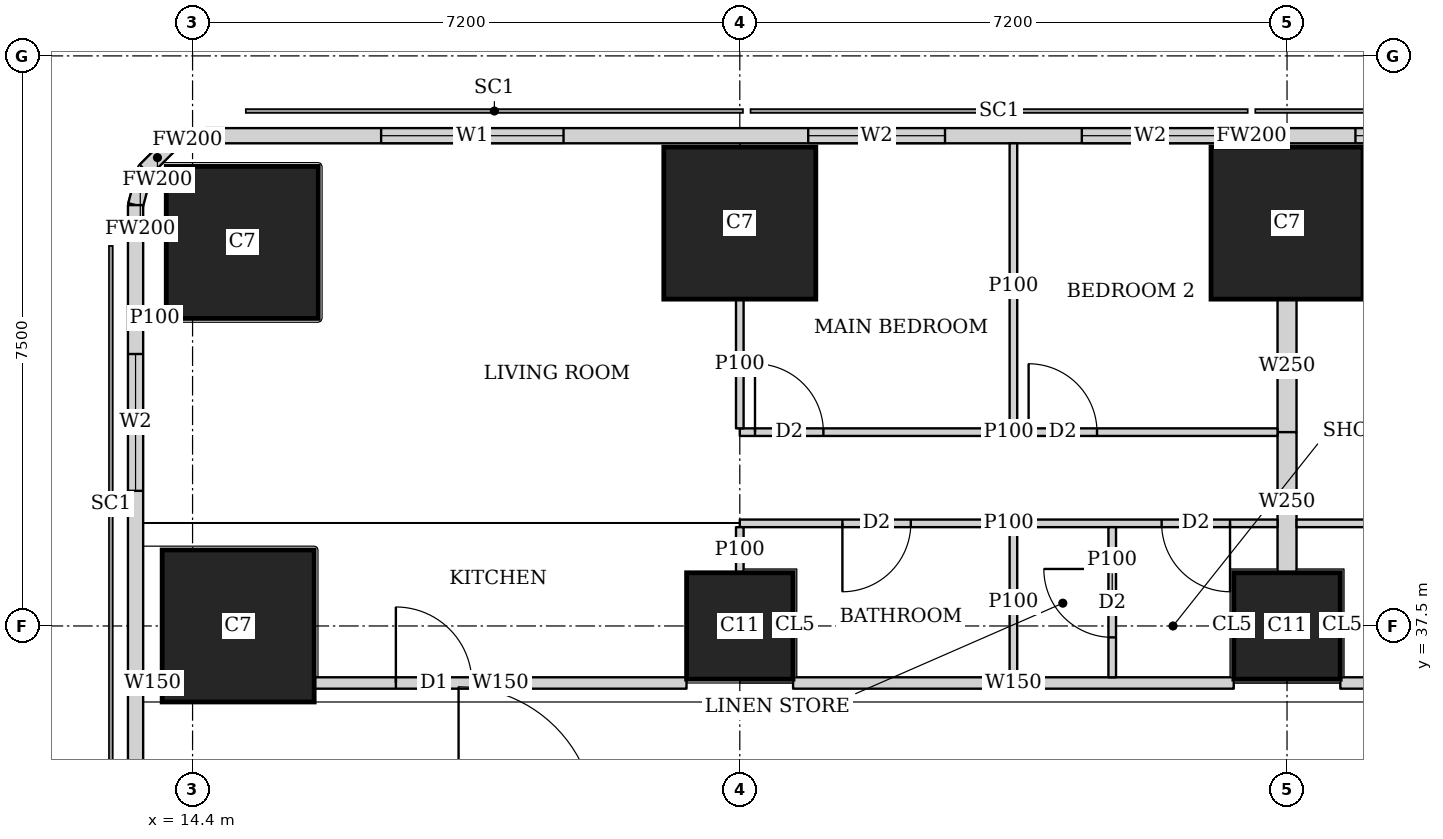
"""IFC4 building model, lengths in metres.
Left out: names, types, materials, properties, quantities, classifications, styles, units other than length and angle.
Written with IfcOpenShell. Run it as: python <this file> out.ifc"""

import sys

from ifc_helpers import new_model, si_unit, direction, frame, frame_2d, origin, origin_2d, place, context, subcontext, project, spatial, rectangle, extrude, element, fill, save


model = new_model("IFC4")
c1 = context("Model", 3, precision=1e-05, world=origin(), true_north=direction((0.0, 1.0)))
c2 = subcontext(c1, "Body", "Model", "MODEL_VIEW")
j1 = project(units=[si_unit("LENGTHUNIT", "METRE"), si_unit("PLANEANGLEUNIT", "RADIAN")], contexts=[c1])
p1 = place(None, origin())
s1 = spatial("IfcSite", under=j1, at=p1, CompositionType="ELEMENT")
p2 = place(p1, origin())
s2 = spatial("IfcBuilding", under=s1, at=p2, CompositionType="ELEMENT")
p3 = place(p2, frame((0.0, 0.0, 281.6)))
s3 = spatial("IfcBuildingStorey", under=s2, at=p3, CompositionType="ELEMENT", Elevation=281.6)
p4 = place(p3, frame((15.0, 37.5, 0.0), z_axis=(0.0, 0.0, 1.0), x_axis=(1.0, 0.0, 0.0)))
e1 = element("IfcColumn", 1, at=p4, inside=s3, PredefinedType="COLUMN", context=c2, shape_type="SweptSolid", body=[
    extrude(rectangle(XDim=2.0, YDim=2.0, at=origin_2d()), origin(), (0.0, 0.0, 1.0), 3.75),
])
for number, where, z_axis, x_axis in (
    (2, (21.6, 37.5, 0.0), (0.0, 0.0, 1.0), (1.0, 0.0, 0.0)),
    (3, (28.8, 37.5, 0.0), (0.0, 0.0, 1.0), (1.0, 0.0, 0.0)),
):
    element("IfcColumn", number, at=place(p3, frame(where, z_axis=z_axis, x_axis=x_axis)), inside=s3, PredefinedType="COLUMN", context=c2, shape_type="SweptSolid", body=[
        extrude(rectangle(XDim=1.4, YDim=1.4, at=origin_2d()), origin(), (0.0, 0.0, 1.0), 3.75),
    ])
for number, where, z_axis, x_axis in (
    (4, (15.054, 42.546, 0.0), (0.0, 0.0, 1.0), (1.0, 0.0, 0.0)),
    (5, (21.6, 42.8, 0.0), (0.0, 0.0, 1.0), (1.0, 0.0, 0.0)),
    (6, (28.8, 42.8, 0.0), (0.0, 0.0, 1.0), (1.0, 0.0, 0.0)),
):
    element("IfcColumn", number, at=place(p3, frame(where, z_axis=z_axis, x_axis=x_axis)), inside=s3, PredefinedType="COLUMN", context=c2, shape_type="SweptSolid", body=[
        extrude(rectangle(XDim=2.0, YDim=2.0, at=origin_2d()), origin(), (0.0, 0.0, 1.0), 3.75),
    ])
p5 = place(p3, frame((42.103, 43.95, 0.0), z_axis=(0.0, 0.0, 1.0), x_axis=(-1.0, 0.0, 0.0)))
e7 = element("IfcWall", 7, at=p5, inside=s3, PredefinedType="SOLIDWALL", context=c2, shape_type="SweptSolid", body=[
    extrude(rectangle(XDim=27.54, YDim=0.2, at=frame_2d((13.77, 0.0))), origin(), (0.0, 0.0, 1.0), 3.5),
])
p6 = place(p5, frame((10.603, 0.0, 0.9)))
e8 = element("IfcOpeningElement", 8, at=p6, cuts=e7, PredefinedType="OPENING", context=c2, shape_type="SweptSolid", body=[
    extrude(rectangle(XDim=1.8, YDim=1.5, at=frame_2d((0.9, 0.75))), frame((0.0, 0.11, 0.0), z_axis=(0.0, -1.0, 0.0), x_axis=(1.0, 0.0, 0.0)), (0.0, 0.0, 1.0), 0.22),
])
p7 = place(p5, frame((14.203, 0.0, 0.9)))
e9 = element("IfcOpeningElement", 9, at=p7, cuts=e7, PredefinedType="OPENING", context=c2, shape_type="SweptSolid", body=[
    extrude(rectangle(XDim=1.8, YDim=1.5, at=frame_2d((0.9, 0.75))), frame((0.0, 0.11, 0.0), z_axis=(0.0, -1.0, 0.0), x_axis=(1.0, 0.0, 0.0)), (0.0, 0.0, 1.0), 0.22),
])
p8 = place(p5, frame((17.803, 0.0, 0.9)))
e10 = element("IfcOpeningElement", 10, at=p8, cuts=e7, PredefinedType="OPENING", context=c2, shape_type="SweptSolid", body=[
    extrude(rectangle(XDim=1.8, YDim=1.5, at=frame_2d((0.9, 0.75))), frame((0.0, 0.11, 0.0), z_axis=(0.0, -1.0, 0.0), x_axis=(1.0, 0.0, 0.0)), (0.0, 0.0, 1.0), 0.22),
])
p9 = place(p5, frame((22.822, 0.0, 0.9)))
e11 = element("IfcOpeningElement", 11, at=p9, cuts=e7, PredefinedType="OPENING", context=c2, shape_type="SweptSolid", body=[
    extrude(rectangle(XDim=2.4, YDim=1.5, at=frame_2d((1.2, 0.75))), frame((0.0, 0.11, 0.0), z_axis=(0.0, -1.0, 0.0), x_axis=(1.0, 0.0, 0.0)), (0.0, 0.0, 1.0), 0.22),
])
p10 = place(p3, frame((14.563, 43.95, 0.0), z_axis=(0.0, 0.0, 1.0), x_axis=(-0.965655254015, -0.259826731483, 0.0)))
e12 = element("IfcWall", 12, at=p10, inside=s3, PredefinedType="SOLIDWALL", context=c2, shape_type="SweptSolid", body=[
    extrude(rectangle(XDim=0.477, YDim=0.2, at=frame_2d((0.239, 0.0))), origin(), (0.0, 0.0, 1.0), 3.5),
])
p11 = place(p3, frame((14.102, 43.826, 0.0), z_axis=(0.0, 0.0, 1.0), x_axis=(-0.707369890659, -0.706843573776, 0.0)))
e13 = element("IfcWall", 13, at=p11, inside=s3, PredefinedType="SOLIDWALL", context=c2, shape_type="SweptSolid", body=[
    extrude(rectangle(XDim=0.464, YDim=0.2, at=frame_2d((0.232, 0.0))), origin(), (0.0, 0.0, 1.0), 3.5),
])
p12 = place(p3, frame((13.774, 43.498, 0.0), z_axis=(0.0, 0.0, 1.0), x_axis=(-0.259826731483, -0.965655254015, 0.0)))
e14 = element("IfcWall", 14, at=p12, inside=s3, PredefinedType="SOLIDWALL", context=c2, shape_type="SweptSolid", body=[
    extrude(rectangle(XDim=0.477, YDim=0.2, at=frame_2d((0.239, 0.0))), origin(), (0.0, 0.0, 1.0), 3.5),
])
p13 = place(p3, frame((13.65, 43.037, 0.0), z_axis=(0.0, 0.0, 1.0), x_axis=(0.0, -1.0, 0.0)))
e15 = element("IfcWall", 15, at=p13, inside=s3, PredefinedType="SOLIDWALL", context=c2, shape_type="SweptSolid", body=[
    extrude(rectangle(XDim=35.374, YDim=0.2, at=frame_2d((17.687, 0.0))), origin(), (0.0, 0.0, 1.0), 3.5),
])
p14 = place(p13, frame((1.959, 0.0, 0.9)))
e16 = element("IfcOpeningElement", 16, at=p14, cuts=e15, PredefinedType="OPENING", context=c2, shape_type="SweptSolid", body=[
    extrude(rectangle(XDim=1.8, YDim=1.5, at=frame_2d((0.9, 0.75))), frame((0.0, 0.11, 0.0), z_axis=(0.0, -1.0, 0.0), x_axis=(1.0, 0.0, 0.0)), (0.0, 0.0, 1.0), 0.22),
])
p15 = place(p3, frame((13.75, 36.75, 0.0), z_axis=(0.0, 0.0, 1.0), x_axis=(1.0, 0.0, 0.0)))
e17 = element("IfcWall", 17, at=p15, inside=s3, PredefinedType="SOLIDWALL", context=c2, shape_type="SweptSolid", body=[
    extrude(rectangle(XDim=0.249, YDim=0.15, at=frame_2d((0.125, 0.0))), origin(), (0.0, 0.0, 1.0), 3.5),
])
p16 = place(p3, frame((16.001, 36.75, 0.0), z_axis=(0.0, 0.0, 1.0), x_axis=(1.0, 0.0, 0.0)))
e18 = element("IfcWall", 18, at=p16, inside=s3, PredefinedType="SOLIDWALL", context=c2, shape_type="SweptSolid", body=[
    extrude(rectangle(XDim=4.898, YDim=0.15, at=frame_2d((2.449, 0.0))), origin(), (0.0, 0.0, 1.0), 3.5),
])
p17 = place(p16, frame((1.074, 0.0, 0.0)))
e19 = element("IfcOpeningElement", 19, at=p17, cuts=e18, PredefinedType="OPENING", context=c2, shape_type="SweptSolid", body=[
    extrude(rectangle(XDim=1.0, YDim=2.1, at=frame_2d((0.5, 1.05))), frame((0.0, 0.085, 0.0), z_axis=(0.0, -1.0, 0.0), x_axis=(1.0, 0.0, 0.0)), (0.0, 0.0, 1.0), 0.17),
])
p18 = place(p3, frame((22.301, 36.75, 0.0), z_axis=(0.0, 0.0, 1.0), x_axis=(1.0, 0.0, 0.0)))
e20 = element("IfcWall", 20, at=p18, inside=s3, PredefinedType="SOLIDWALL", context=c2, shape_type="SweptSolid", body=[
    extrude(rectangle(XDim=5.798, YDim=0.15, at=frame_2d((2.899, 0.0))), origin(), (0.0, 0.0, 1.0), 3.5),
])
p19 = place(p3, frame((29.501, 36.75, 0.0), z_axis=(0.0, 0.0, 1.0), x_axis=(1.0, 0.0, 0.0)))
e21 = element("IfcWall", 21, at=p19, inside=s3, PredefinedType="SOLIDWALL", context=c2, shape_type="SweptSolid", body=[
    extrude(rectangle(XDim=5.216, YDim=0.15, at=frame_2d((2.608, 0.0))), origin(), (0.0, 0.0, 1.0), 3.5),
])
p20 = place(p19, frame((3.305, 0.0, 0.0)))
e22 = element("IfcOpeningElement", 22, at=p20, cuts=e21, PredefinedType="OPENING", context=c2, shape_type="SweptSolid", body=[
    extrude(rectangle(XDim=1.0, YDim=2.1, at=frame_2d((0.5, 1.05))), frame((0.0, 0.085, 0.0), z_axis=(0.0, -1.0, 0.0), x_axis=(1.0, 0.0, 0.0)), (0.0, 0.0, 1.0), 0.17),
])
p21 = place(p3, frame((14.054, 41.546, 0.0), z_axis=(0.0, 0.0, 1.0), x_axis=(-1.0, 0.0, 0.0)))
e23 = element("IfcWall", 23, at=p21, inside=s3, PredefinedType="PARTITIONING", context=c2, shape_type="SweptSolid", body=[
    extrude(rectangle(XDim=0.304, YDim=0.1, at=frame_2d((0.152, 0.0))), origin(), (0.0, 0.0, 1.0), 3.5),
])
p22 = place(p3, frame((21.6, 40.05, 0.0), z_axis=(0.0, 0.0, 1.0), x_axis=(1.0, 0.0, 0.0)))
e24 = element("IfcWall", 24, at=p22, inside=s3, PredefinedType="PARTITIONING", context=c2, shape_type="SweptSolid", body=[
    extrude(rectangle(XDim=7.075, YDim=0.1, at=frame_2d((3.538, 0.0))), origin(), (0.0, 0.0, 1.0), 3.5),
])
p23 = place(p22, frame((0.2, 0.0, 0.0)))
e25 = element("IfcOpeningElement", 25, at=p23, cuts=e24, PredefinedType="OPENING", context=c2, shape_type="SweptSolid", body=[
    extrude(rectangle(XDim=0.9, YDim=2.1, at=frame_2d((0.45, 1.05))), frame((0.0, 0.06, 0.0), z_axis=(0.0, -1.0, 0.0), x_axis=(1.0, 0.0, 0.0)), (0.0, 0.0, 1.0), 0.12),
])
p24 = place(p22, frame((3.8, 0.0, 0.0)))
e26 = element("IfcOpeningElement", 26, at=p24, cuts=e24, PredefinedType="OPENING", context=c2, shape_type="SweptSolid", body=[
    extrude(rectangle(XDim=0.9, YDim=2.1, at=frame_2d((0.45, 1.05))), frame((0.0, 0.06, 0.0), z_axis=(0.0, -1.0, 0.0), x_axis=(1.0, 0.0, 0.0)), (0.0, 0.0, 1.0), 0.12),
])
p25 = place(p3, frame((21.6, 38.85, 0.0), z_axis=(0.0, 0.0, 1.0), x_axis=(1.0, 0.0, 0.0)))
e27 = element("IfcWall", 27, at=p25, inside=s3, PredefinedType="PARTITIONING", context=c2, shape_type="SweptSolid", body=[
    extrude(rectangle(XDim=7.075, YDim=0.1, at=frame_2d((3.538, 0.0))), origin(), (0.0, 0.0, 1.0), 3.5),
])
p26 = place(p25, frame((1.35, 0.0, 0.0)))
e28 = element("IfcOpeningElement", 28, at=p26, cuts=e27, PredefinedType="OPENING", context=c2, shape_type="SweptSolid", body=[
    extrude(rectangle(XDim=0.9, YDim=2.1, at=frame_2d((0.45, 1.05))), frame((0.0, 0.06, 0.0), z_axis=(0.0, -1.0, 0.0), x_axis=(1.0, 0.0, 0.0)), (0.0, 0.0, 1.0), 0.12),
])
p27 = place(p25, frame((5.55, 0.0, 0.0)))
e29 = element("IfcOpeningElement", 29, at=p27, cuts=e27, PredefinedType="OPENING", context=c2, shape_type="SweptSolid", body=[
    extrude(rectangle(XDim=0.9, YDim=2.1, at=frame_2d((0.45, 1.05))), frame((0.0, 0.06, 0.0), z_axis=(0.0, -1.0, 0.0), x_axis=(1.0, 0.0, 0.0)), (0.0, 0.0, 1.0), 0.12),
])
p28 = place(p3, frame((21.6, 40.1, 0.0), z_axis=(0.0, 0.0, 1.0), x_axis=(0.0, 1.0, 0.0)))
e30 = element("IfcWall", 30, at=p28, inside=s3, PredefinedType="PARTITIONING", context=c2, shape_type="SweptSolid", body=[
    extrude(rectangle(XDim=1.699, YDim=0.1, at=frame_2d((0.85, 0.0))), origin(), (0.0, 0.0, 1.0), 3.5),
])
p29 = place(p3, frame((25.2, 40.1, 0.0), z_axis=(0.0, 0.0, 1.0), x_axis=(0.0, 1.0, 0.0)))
e31 = element("IfcWall", 31, at=p29, inside=s3, PredefinedType="PARTITIONING", context=c2, shape_type="SweptSolid", body=[
    extrude(rectangle(XDim=3.75, YDim=0.1, at=frame_2d((1.875, 0.0))), origin(), (0.0, 0.0, 1.0), 2.05),
])
p30 = place(p3, frame((21.6, 38.201, 0.0), z_axis=(0.0, 0.0, 1.0), x_axis=(0.0, 1.0, 0.0)))
e32 = element("IfcWall", 32, at=p30, inside=s3, PredefinedType="PARTITIONING", context=c2, shape_type="SweptSolid", body=[
    extrude(rectangle(XDim=0.599, YDim=0.1, at=frame_2d((0.3, 0.0))), origin(), (0.0, 0.0, 1.0), 3.5),
])
p31 = place(p3, frame((25.2, 36.825, 0.0), z_axis=(0.0, 0.0, 1.0), x_axis=(0.0, 1.0, 0.0)))
e33 = element("IfcWall", 33, at=p31, inside=s3, PredefinedType="PARTITIONING", context=c2, shape_type="SweptSolid", body=[
    extrude(rectangle(XDim=1.975, YDim=0.1, at=frame_2d((0.988, 0.0))), origin(), (0.0, 0.0, 1.0), 3.5),
])
p32 = place(p3, frame((26.5, 36.825, 0.0), z_axis=(0.0, 0.0, 1.0), x_axis=(0.0, 1.0, 0.0)))
e34 = element("IfcWall", 34, at=p32, inside=s3, PredefinedType="PARTITIONING", context=c2, shape_type="SweptSolid", body=[
    extrude(rectangle(XDim=1.975, YDim=0.1, at=frame_2d((0.988, 0.0))), origin(), (0.0, 0.0, 1.0), 3.5),
])
p33 = place(p32, frame((0.525, 0.0, 0.0)))
e35 = element("IfcOpeningElement", 35, at=p33, cuts=e34, PredefinedType="OPENING", context=c2, shape_type="SweptSolid", body=[
    extrude(rectangle(XDim=0.9, YDim=2.1, at=frame_2d((0.45, 1.05))), frame((0.0, 0.06, 0.0), z_axis=(0.0, -1.0, 0.0), x_axis=(1.0, 0.0, 0.0)), (0.0, 0.0, 1.0), 0.12),
])
p34 = place(p3, frame((28.925, 38.85, 0.0), z_axis=(0.0, 0.0, 1.0), x_axis=(1.0, 0.0, 0.0)))
e36 = element("IfcWall", 36, at=p34, inside=s3, PredefinedType="PARTITIONING", context=c2, shape_type="SweptSolid", body=[
    extrude(rectangle(XDim=2.879, YDim=0.1, at=frame_2d((1.439, 0.0))), origin(), (0.0, 0.0, 1.0), 3.5),
])
p35 = place(p34, frame((0.925, 0.0, 0.0)))
e37 = element("IfcOpeningElement", 37, at=p35, cuts=e36, PredefinedType="OPENING", context=c2, shape_type="SweptSolid", body=[
    extrude(rectangle(XDim=0.9, YDim=2.1, at=frame_2d((0.45, 1.05))), frame((0.0, 0.06, 0.0), z_axis=(0.0, -1.0, 0.0), x_axis=(1.0, 0.0, 0.0)), (0.0, 0.0, 1.0), 0.12),
])
p36 = place(p3, frame((28.8, 40.05, 0.0), z_axis=(0.0, 0.0, 1.0), x_axis=(0.0, 1.0, 0.0)))
e38 = element("IfcWall", 38, at=p36, inside=s3, PredefinedType="SOLIDWALL", context=c2, shape_type="SweptSolid", body=[
    extrude(rectangle(XDim=1.749, YDim=0.25, at=frame_2d((0.875, 0.0))), origin(), (0.0, 0.0, 1.0), 3.5),
])
p37 = place(p3, frame((28.8, 38.201, 0.0), z_axis=(0.0, 0.0, 1.0), x_axis=(0.0, 1.0, 0.0)))
e39 = element("IfcWall", 39, at=p37, inside=s3, PredefinedType="SOLIDWALL", context=c2, shape_type="SweptSolid", body=[
    extrude(rectangle(XDim=1.849, YDim=0.25, at=frame_2d((0.925, 0.0))), origin(), (0.0, 0.0, 1.0), 3.5),
])
p38 = place(p6, origin())
e40 = element("IfcWindow", 40, at=p38, inside=s3, PartitioningType="SINGLE_PANEL", PredefinedType="WINDOW", context=c2, shape_type="SweptSolid", body=[
    extrude(rectangle(XDim=1.8, YDim=1.5, at=frame_2d((0.9, 0.75))), frame((0.0, 0.03, 0.0), z_axis=(0.0, -1.0, 0.0), x_axis=(1.0, 0.0, 0.0)), (0.0, 0.0, 1.0), 0.06),
])
fill(e8, e40)
p39 = place(p7, origin())
e41 = element("IfcWindow", 41, at=p39, inside=s3, PartitioningType="SINGLE_PANEL", PredefinedType="WINDOW", context=c2, shape_type="SweptSolid", body=[
    extrude(rectangle(XDim=1.8, YDim=1.5, at=frame_2d((0.9, 0.75))), frame((0.0, 0.03, 0.0), z_axis=(0.0, -1.0, 0.0), x_axis=(1.0, 0.0, 0.0)), (0.0, 0.0, 1.0), 0.06),
])
fill(e9, e41)
p40 = place(p8, origin())
e42 = element("IfcWindow", 42, at=p40, inside=s3, PartitioningType="SINGLE_PANEL", PredefinedType="WINDOW", context=c2, shape_type="SweptSolid", body=[
    extrude(rectangle(XDim=1.8, YDim=1.5, at=frame_2d((0.9, 0.75))), frame((0.0, 0.03, 0.0), z_axis=(0.0, -1.0, 0.0), x_axis=(1.0, 0.0, 0.0)), (0.0, 0.0, 1.0), 0.06),
])
fill(e10, e42)
p41 = place(p9, origin())
e43 = element("IfcWindow", 43, at=p41, inside=s3, PartitioningType="SINGLE_PANEL", PredefinedType="WINDOW", context=c2, shape_type="SweptSolid", body=[
    extrude(rectangle(XDim=2.4, YDim=1.5, at=frame_2d((1.2, 0.75))), frame((0.0, 0.03, 0.0), z_axis=(0.0, -1.0, 0.0), x_axis=(1.0, 0.0, 0.0)), (0.0, 0.0, 1.0), 0.06),
])
fill(e11, e43)
p42 = place(p14, origin())
e44 = element("IfcWindow", 44, at=p42, inside=s3, PartitioningType="SINGLE_PANEL", PredefinedType="WINDOW", context=c2, shape_type="SweptSolid", body=[
    extrude(rectangle(XDim=1.8, YDim=1.5, at=frame_2d((0.9, 0.75))), frame((0.0, 0.03, 0.0), z_axis=(0.0, -1.0, 0.0), x_axis=(1.0, 0.0, 0.0)), (0.0, 0.0, 1.0), 0.06),
])
fill(e16, e44)
p43 = place(p23, origin())
e45 = element("IfcDoor", 45, at=p43, inside=s3, OperationType="SINGLE_SWING_LEFT", PredefinedType="DOOR", context=c2, shape_type="SweptSolid", body=[
    extrude(rectangle(XDim=0.9, YDim=2.1, at=frame_2d((0.45, 1.05))), frame((0.0, 0.025, 0.0), z_axis=(0.0, -1.0, 0.0), x_axis=(1.0, 0.0, 0.0)), (0.0, 0.0, 1.0), 0.05),
])
fill(e25, e45)
p44 = place(p24, origin())
e46 = element("IfcDoor", 46, at=p44, inside=s3, OperationType="SINGLE_SWING_LEFT", PredefinedType="DOOR", context=c2, shape_type="SweptSolid", body=[
    extrude(rectangle(XDim=0.9, YDim=2.1, at=frame_2d((0.45, 1.05))), frame((0.0, 0.025, 0.0), z_axis=(0.0, -1.0, 0.0), x_axis=(1.0, 0.0, 0.0)), (0.0, 0.0, 1.0), 0.05),
])
fill(e26, e46)
p45 = place(p26, origin())
e47 = element("IfcDoor", 47, at=p45, inside=s3, OperationType="SINGLE_SWING_RIGHT", PredefinedType="DOOR", context=c2, shape_type="SweptSolid", body=[
    extrude(rectangle(XDim=0.9, YDim=2.1, at=frame_2d((0.45, 1.05))), frame((0.0, 0.025, 0.0), z_axis=(0.0, -1.0, 0.0), x_axis=(1.0, 0.0, 0.0)), (0.0, 0.0, 1.0), 0.05),
])
fill(e28, e47)
p46 = place(p27, origin())
e48 = element("IfcDoor", 48, at=p46, inside=s3, OperationType="SINGLE_SWING_LEFT", PredefinedType="DOOR", context=c2, shape_type="SweptSolid", body=[
    extrude(rectangle(XDim=0.9, YDim=2.1, at=frame_2d((0.45, 1.05))), frame((0.0, 0.025, 0.0), z_axis=(0.0, -1.0, 0.0), x_axis=(1.0, 0.0, 0.0)), (0.0, 0.0, 1.0), 0.05),
])
fill(e29, e48)
p47 = place(p33, origin())
e49 = element("IfcDoor", 49, at=p47, inside=s3, OperationType="SINGLE_SWING_RIGHT", PredefinedType="DOOR", context=c2, shape_type="SweptSolid", body=[
    extrude(rectangle(XDim=0.9, YDim=2.1, at=frame_2d((0.45, 1.05))), frame((0.0, 0.025, 0.0), z_axis=(0.0, -1.0, 0.0), x_axis=(1.0, 0.0, 0.0)), (0.0, 0.0, 1.0), 0.05),
])
fill(e35, e49)
p48 = place(p17, origin())
e50 = element("IfcDoor", 50, at=p48, inside=s3, OperationType="SINGLE_SWING_LEFT", PredefinedType="DOOR", context=c2, shape_type="SweptSolid", body=[
    extrude(rectangle(XDim=1.0, YDim=2.1, at=frame_2d((0.5, 1.05))), frame((0.0, 0.025, 0.0), z_axis=(0.0, -1.0, 0.0), x_axis=(1.0, 0.0, 0.0)), (0.0, 0.0, 1.0), 0.05),
])
fill(e19, e50)
save(model, sys.argv[1])
